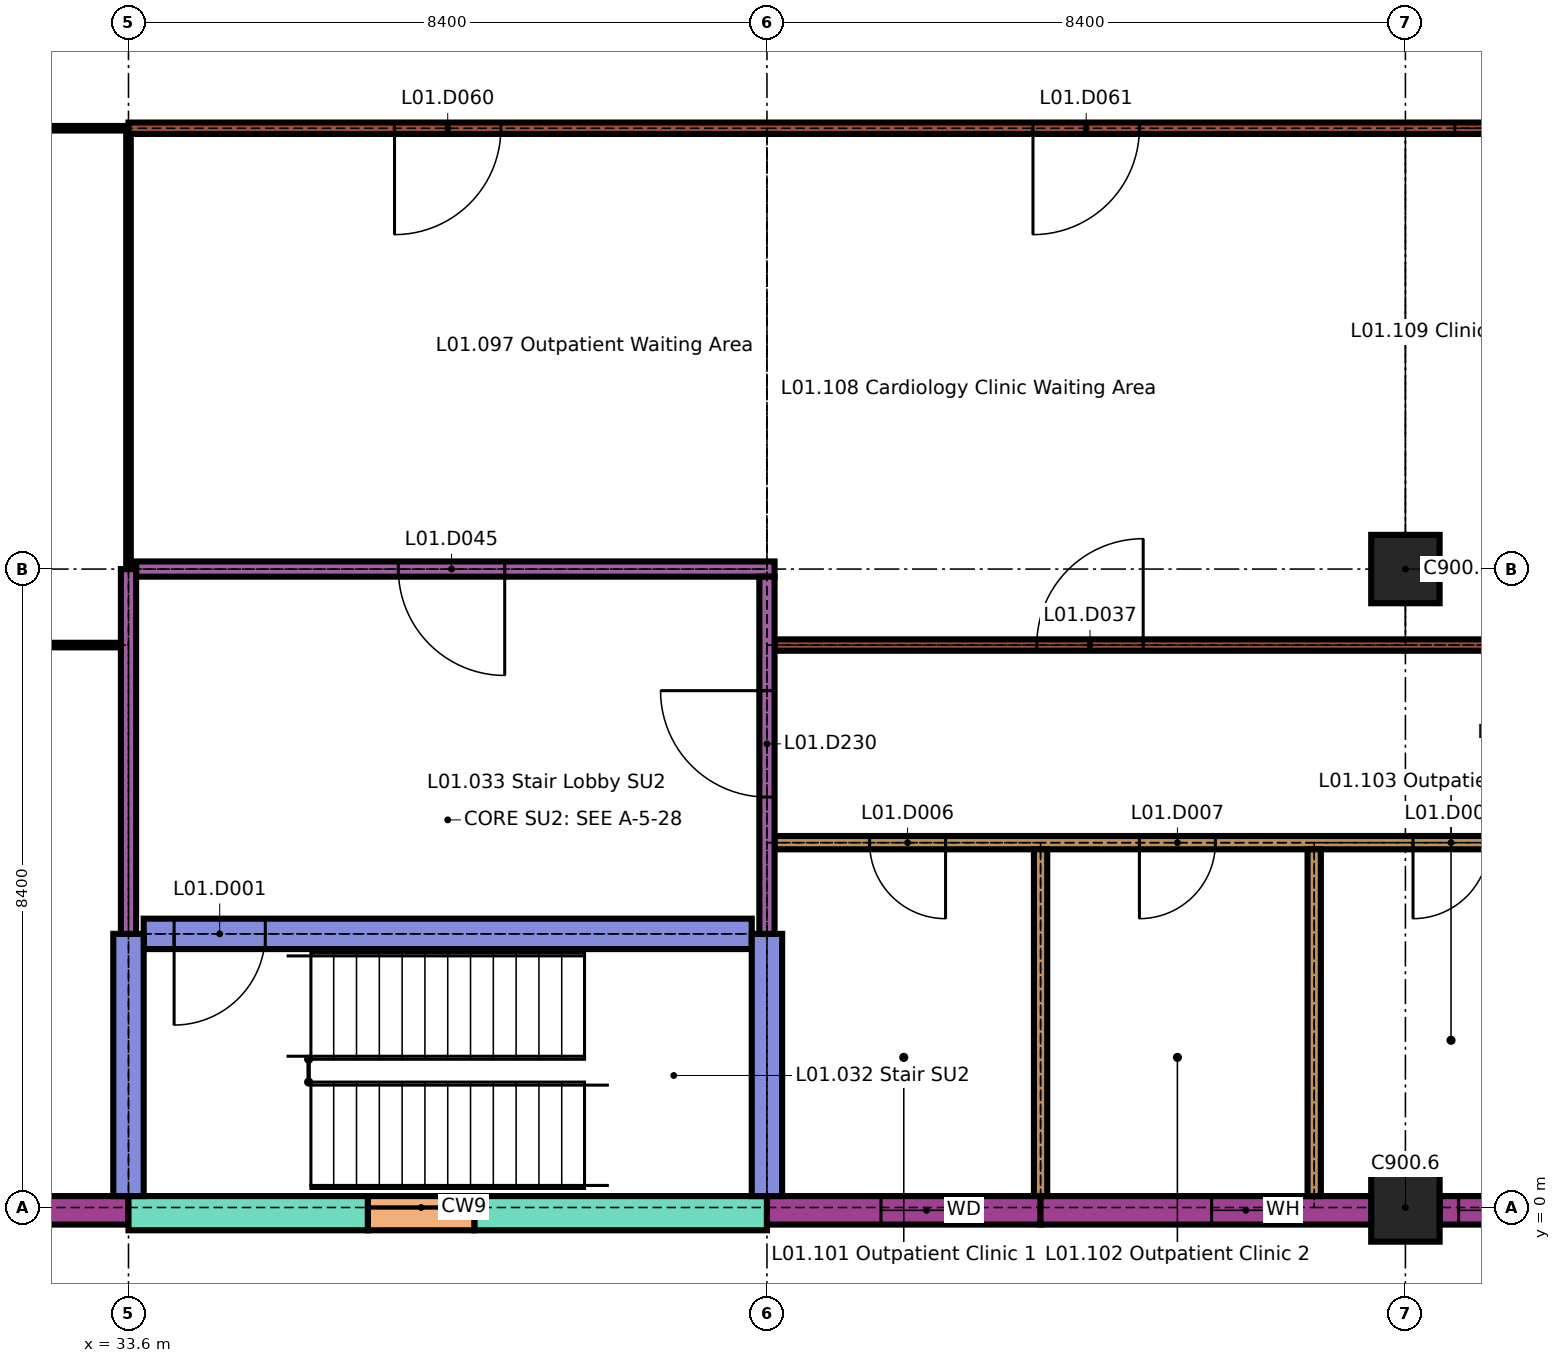
"""IFC4 building model, lengths in metres.
Left out: names, types, materials, properties, quantities, classifications, styles, units other than length and angle.
Written with IfcOpenShell. Run it as: python <this file> out.ifc"""

import sys

from ifc_helpers import new_model, si_unit, direction, frame, frame_2d, origin, origin_2d, place, context, subcontext, project, spatial, rectangle, extrude, element, fill, save


model = new_model("IFC4")
c1 = context("Model", 3, precision=1e-05, world=origin(), true_north=direction((0.0, 1.0)))
c2 = subcontext(c1, "Body", "Model", "MODEL_VIEW")
j1 = project(units=[si_unit("LENGTHUNIT", "METRE"), si_unit("PLANEANGLEUNIT", "RADIAN")], contexts=[c1])
p1 = place(None, origin())
s1 = spatial("IfcSite", under=j1, at=p1, CompositionType="ELEMENT")
p2 = place(p1, origin())
s2 = spatial("IfcBuilding", under=s1, at=p2, CompositionType="ELEMENT")
p3 = place(p2, frame((0.0, 0.0, 4.5)))
s3 = spatial("IfcBuildingStorey", under=s2, at=p3, CompositionType="ELEMENT", Elevation=4.5)
for number, where, z_axis, x_axis in (
    (1, (50.4, 0.0, 0.0), (0.0, 0.0, 1.0), (1.0, 0.0, 0.0)),
    (2, (50.4, 8.4, 0.0), (0.0, 0.0, 1.0), (1.0, 0.0, 0.0)),
):
    element("IfcColumn", number, at=place(p3, frame(where, z_axis=z_axis, x_axis=x_axis)), inside=s3, PredefinedType="COLUMN", context=c2, shape_type="SweptSolid", body=[
        extrude(rectangle(XDim=0.9, YDim=0.9, at=origin_2d()), origin(), (0.0, 0.0, 1.0), 3.45),
    ])
p4 = place(p3, frame((25.625, -0.038, 0.0), z_axis=(0.0, 0.0, 1.0), x_axis=(1.0, 0.0, 0.0)))
e3 = element("IfcWall", 3, at=p4, inside=s3, PredefinedType="SOLIDWALL", context=c2, shape_type="SweptSolid", body=[
    extrude(rectangle(XDim=7.975, YDim=0.375, at=frame_2d((3.988, 0.0))), origin(), (0.0, 0.0, 1.0), 3.15),
])
p5 = place(p3, frame((33.6, -0.075, 0.0), z_axis=(0.0, 0.0, 1.0), x_axis=(1.0, 0.0, 0.0)))
e4 = element("IfcWall", 4, at=p5, inside=s3, PredefinedType="SOLIDWALL", context=c2, shape_type="SweptSolid", body=[
    extrude(rectangle(XDim=3.15, YDim=0.45, at=frame_2d((1.575, 0.0))), origin(), (0.0, 0.0, 1.0), 3.45),
])
p6 = place(p3, frame((38.15, -0.075, 0.0), z_axis=(0.0, 0.0, 1.0), x_axis=(1.0, 0.0, 0.0)))
e5 = element("IfcWall", 5, at=p6, inside=s3, PredefinedType="SOLIDWALL", context=c2, shape_type="SweptSolid", body=[
    extrude(rectangle(XDim=3.85, YDim=0.45, at=frame_2d((1.925, 0.0))), origin(), (0.0, 0.0, 1.0), 3.45),
])
p7 = place(p3, frame((36.75, -0.075, 0.0), z_axis=(0.0, 0.0, 1.0), x_axis=(1.0, 0.0, 0.0)))
e6 = element("IfcWall", 6, at=p7, inside=s3, PredefinedType="SOLIDWALL", context=c2, shape_type="SweptSolid", body=[
    extrude(rectangle(XDim=1.4, YDim=0.45, at=frame_2d((0.7, 0.0))), origin(), (0.0, 0.0, 1.0), 0.6),
])
p8 = place(p3, frame((42.0, -0.038, 0.0), z_axis=(0.0, 0.0, 1.0), x_axis=(1.0, 0.0, 0.0)))
e7 = element("IfcWall", 7, at=p8, inside=s3, PredefinedType="SOLIDWALL", context=c2, shape_type="SweptSolid", body=[
    extrude(rectangle(XDim=3.6, YDim=0.375, at=frame_2d((1.8, 0.0))), origin(), (0.0, 0.0, 1.0), 3.15),
])
p9 = place(p8, frame((1.5, 0.0, 0.9)))
e8 = element("IfcOpeningElement", 8, at=p9, cuts=e7, PredefinedType="OPENING", context=c2, shape_type="SweptSolid", body=[
    extrude(rectangle(XDim=1.2, YDim=1.5, at=frame_2d((0.6, 0.75))), frame((0.0, 0.198, 0.0), z_axis=(0.0, -1.0, 0.0), x_axis=(1.0, 0.0, 0.0)), (0.0, 0.0, 1.0), 0.395),
])
p10 = place(p3, frame((45.6, -0.038, 0.0), z_axis=(0.0, 0.0, 1.0), x_axis=(1.0, 0.0, 0.0)))
e9 = element("IfcWall", 9, at=p10, inside=s3, PredefinedType="SOLIDWALL", context=c2, shape_type="SweptSolid", body=[
    extrude(rectangle(XDim=4.35, YDim=0.375, at=frame_2d((2.175, 0.0))), origin(), (0.0, 0.0, 1.0), 3.15),
])
p11 = place(p10, frame((2.25, 0.0, 0.9)))
e10 = element("IfcOpeningElement", 10, at=p11, cuts=e9, PredefinedType="OPENING", context=c2, shape_type="SweptSolid", body=[
    extrude(rectangle(XDim=0.9, YDim=1.5, at=frame_2d((0.45, 0.75))), frame((0.0, 0.198, 0.0), z_axis=(0.0, -1.0, 0.0), x_axis=(1.0, 0.0, 0.0)), (0.0, 0.0, 1.0), 0.395),
])
p12 = place(p3, frame((50.85, -0.038, 0.0), z_axis=(0.0, 0.0, 1.0), x_axis=(1.0, 0.0, 0.0)))
e11 = element("IfcWall", 11, at=p12, inside=s3, PredefinedType="SOLIDWALL", context=c2, shape_type="SweptSolid", body=[
    extrude(rectangle(XDim=1.95, YDim=0.375, at=frame_2d((0.975, 0.0))), origin(), (0.0, 0.0, 1.0), 3.15),
])
p13 = place(p12, frame((0.25, 0.0, 0.9)))
e12 = element("IfcOpeningElement", 12, at=p13, cuts=e11, PredefinedType="OPENING", context=c2, shape_type="SweptSolid", body=[
    extrude(rectangle(XDim=1.2, YDim=1.5, at=frame_2d((0.6, 0.75))), frame((0.0, 0.198, 0.0), z_axis=(0.0, -1.0, 0.0), x_axis=(1.0, 0.0, 0.0)), (0.0, 0.0, 1.0), 0.395),
])
p14 = place(p3, frame((33.8, 3.6, 0.0), z_axis=(0.0, 0.0, 1.0), x_axis=(1.0, 0.0, 0.0)))
e13 = element("IfcWall", 13, at=p14, inside=s3, PredefinedType="SHEAR", context=c2, shape_type="SweptSolid", body=[
    extrude(rectangle(XDim=8.0, YDim=0.4, at=frame_2d((4.0, 0.0))), origin(), (0.0, 0.0, 1.0), 3.45),
])
p15 = place(p14, frame((0.4, 0.0, 0.0)))
e14 = element("IfcOpeningElement", 14, at=p15, cuts=e13, PredefinedType="OPENING", context=c2, shape_type="SweptSolid", body=[
    extrude(rectangle(XDim=1.2, YDim=2.1, at=frame_2d((0.6, 1.05))), frame((0.0, 0.21, 0.0), z_axis=(0.0, -1.0, 0.0), x_axis=(1.0, 0.0, 0.0)), (0.0, 0.0, 1.0), 0.42),
])
p16 = place(p3, frame((42.1, 4.8, 0.0), z_axis=(0.0, 0.0, 1.0), x_axis=(1.0, 0.0, 0.0)))
e15 = element("IfcWall", 15, at=p16, inside=s3, PredefinedType="PARTITIONING", context=c2, shape_type="SweptSolid", body=[
    extrude(rectangle(XDim=25.0, YDim=0.175, at=frame_2d((12.5, 0.0))), origin(), (0.0, 0.0, 1.0), 3.45),
])
p17 = place(p16, frame((1.25, 0.0, 0.0)))
e16 = element("IfcOpeningElement", 16, at=p17, cuts=e15, PredefinedType="OPENING", context=c2, shape_type="SweptSolid", body=[
    extrude(rectangle(XDim=1.0, YDim=2.1, at=frame_2d((0.5, 1.05))), frame((0.0, 0.097, 0.0), z_axis=(0.0, -1.0, 0.0), x_axis=(1.0, 0.0, 0.0)), (0.0, 0.0, 1.0), 0.195),
])
p18 = place(p16, frame((4.8, 0.0, 0.0)))
e17 = element("IfcOpeningElement", 17, at=p18, cuts=e15, PredefinedType="OPENING", context=c2, shape_type="SweptSolid", body=[
    extrude(rectangle(XDim=1.0, YDim=2.1, at=frame_2d((0.5, 1.05))), frame((0.0, 0.097, 0.0), z_axis=(0.0, -1.0, 0.0), x_axis=(1.0, 0.0, 0.0)), (0.0, 0.0, 1.0), 0.195),
])
p19 = place(p16, frame((8.4, 0.0, 0.0)))
e18 = element("IfcOpeningElement", 18, at=p19, cuts=e15, PredefinedType="OPENING", context=c2, shape_type="SweptSolid", body=[
    extrude(rectangle(XDim=1.0, YDim=2.1, at=frame_2d((0.5, 1.05))), frame((0.0, 0.097, 0.0), z_axis=(0.0, -1.0, 0.0), x_axis=(1.0, 0.0, 0.0)), (0.0, 0.0, 1.0), 0.195),
])
p20 = place(p16, frame((12.0, 0.0, 0.0)))
e19 = element("IfcOpeningElement", 19, at=p20, cuts=e15, PredefinedType="OPENING", context=c2, shape_type="SweptSolid", body=[
    extrude(rectangle(XDim=1.0, YDim=2.1, at=frame_2d((0.5, 1.05))), frame((0.0, 0.097, 0.0), z_axis=(0.0, -1.0, 0.0), x_axis=(1.0, 0.0, 0.0)), (0.0, 0.0, 1.0), 0.195),
])
p21 = place(p16, frame((15.6, 0.0, 0.0)))
e20 = element("IfcOpeningElement", 20, at=p21, cuts=e15, PredefinedType="OPENING", context=c2, shape_type="SweptSolid", body=[
    extrude(rectangle(XDim=1.0, YDim=2.1, at=frame_2d((0.5, 1.05))), frame((0.0, 0.097, 0.0), z_axis=(0.0, -1.0, 0.0), x_axis=(1.0, 0.0, 0.0)), (0.0, 0.0, 1.0), 0.195),
])
p22 = place(p16, frame((19.2, 0.0, 0.0)))
e21 = element("IfcOpeningElement", 21, at=p22, cuts=e15, PredefinedType="OPENING", context=c2, shape_type="SweptSolid", body=[
    extrude(rectangle(XDim=1.0, YDim=2.1, at=frame_2d((0.5, 1.05))), frame((0.0, 0.097, 0.0), z_axis=(0.0, -1.0, 0.0), x_axis=(1.0, 0.0, 0.0)), (0.0, 0.0, 1.0), 0.195),
])
p23 = place(p16, frame((22.75, 0.0, 0.0)))
e22 = element("IfcOpeningElement", 22, at=p23, cuts=e15, PredefinedType="OPENING", context=c2, shape_type="SweptSolid", body=[
    extrude(rectangle(XDim=1.0, YDim=2.1, at=frame_2d((0.5, 1.05))), frame((0.0, 0.097, 0.0), z_axis=(0.0, -1.0, 0.0), x_axis=(1.0, 0.0, 0.0)), (0.0, 0.0, 1.0), 0.195),
])
p24 = place(p3, frame((25.325, 7.4, 0.0), z_axis=(0.0, 0.0, 1.0), x_axis=(1.0, 0.0, 0.0)))
e23 = element("IfcWall", 23, at=p24, inside=s3, PredefinedType="PARTITIONING", context=c2, shape_type="SweptSolid", body=[
    extrude(rectangle(XDim=8.175, YDim=0.06, at=frame_2d((4.087, 0.0))), origin(), (0.0, 0.0, 1.0), 3.45),
])
p25 = place(p24, frame((3.587, 0.0, 0.0)))
e24 = element("IfcOpeningElement", 24, at=p25, cuts=e23, PredefinedType="OPENING", context=c2, shape_type="SweptSolid", body=[
    extrude(rectangle(XDim=1.0, YDim=2.1, at=frame_2d((0.5, 1.05))), frame((0.0, 0.04, 0.0), z_axis=(0.0, -1.0, 0.0), x_axis=(1.0, 0.0, 0.0)), (0.0, 0.0, 1.0), 0.08),
])
p26 = place(p3, frame((42.1, 7.4, 0.0), z_axis=(0.0, 0.0, 1.0), x_axis=(1.0, 0.0, 0.0)))
e25 = element("IfcWall", 25, at=p26, inside=s3, PredefinedType="PARTITIONING", context=c2, shape_type="SweptSolid", body=[
    extrude(rectangle(XDim=11.1, YDim=0.15, at=frame_2d((5.55, 0.0))), origin(), (0.0, 0.0, 1.0), 3.45),
])
p27 = place(p26, frame((3.45, 0.0, 0.0)))
e26 = element("IfcOpeningElement", 26, at=p27, cuts=e25, PredefinedType="OPENING", context=c2, shape_type="SweptSolid", body=[
    extrude(rectangle(XDim=1.4, YDim=2.1, at=frame_2d((0.7, 1.05))), frame((0.0, 0.085, 0.0), z_axis=(0.0, -1.0, 0.0), x_axis=(1.0, 0.0, 0.0)), (0.0, 0.0, 1.0), 0.17),
])
p28 = place(p3, frame((33.7, 8.4, 0.0), z_axis=(0.0, 0.0, 1.0), x_axis=(1.0, 0.0, 0.0)))
e27 = element("IfcWall", 27, at=p28, inside=s3, PredefinedType="PARTITIONING", context=c2, shape_type="SweptSolid", body=[
    extrude(rectangle(XDim=8.4, YDim=0.2, at=frame_2d((4.2, 0.0))), origin(), (0.0, 0.0, 1.0), 3.45),
])
p29 = place(p28, frame((3.45, 0.0, 0.0)))
e28 = element("IfcOpeningElement", 28, at=p29, cuts=e27, PredefinedType="OPENING", context=c2, shape_type="SweptSolid", body=[
    extrude(rectangle(XDim=1.4, YDim=2.1, at=frame_2d((0.7, 1.05))), frame((0.0, 0.11, 0.0), z_axis=(0.0, -1.0, 0.0), x_axis=(1.0, 0.0, 0.0)), (0.0, 0.0, 1.0), 0.22),
])
p30 = place(p3, frame((25.2, 14.2, 0.0), z_axis=(0.0, 0.0, 1.0), x_axis=(1.0, 0.0, 0.0)))
e29 = element("IfcWall", 29, at=p30, inside=s3, PredefinedType="PARTITIONING", context=c2, shape_type="SweptSolid", body=[
    extrude(rectangle(XDim=8.4, YDim=0.06, at=frame_2d((4.2, 0.0))), origin(), (0.0, 0.0, 1.0), 3.45),
])
p31 = place(p30, frame((3.5, 0.0, 0.0)))
e30 = element("IfcOpeningElement", 30, at=p31, cuts=e29, PredefinedType="OPENING", context=c2, shape_type="SweptSolid", body=[
    extrude(rectangle(XDim=1.4, YDim=2.1, at=frame_2d((0.7, 1.05))), frame((0.0, 0.04, 0.0), z_axis=(0.0, -1.0, 0.0), x_axis=(1.0, 0.0, 0.0)), (0.0, 0.0, 1.0), 0.08),
])
p32 = place(p30, frame((1.4, 0.0, 0.9)))
e31 = element("IfcOpeningElement", 31, at=p32, cuts=e29, PredefinedType="OPENING", context=c2, shape_type="SweptSolid", body=[
    extrude(rectangle(XDim=1.8, YDim=1.0, at=frame_2d((0.9, 0.5))), frame((0.0, 0.04, 0.0), z_axis=(0.0, -1.0, 0.0), x_axis=(1.0, 0.0, 0.0)), (0.0, 0.0, 1.0), 0.08),
])
p33 = place(p3, frame((33.6, 14.2, 0.0), z_axis=(0.0, 0.0, 1.0), x_axis=(1.0, 0.0, 0.0)))
e32 = element("IfcWall", 32, at=p33, inside=s3, PredefinedType="PARTITIONING", context=c2, shape_type="SweptSolid", body=[
    extrude(rectangle(XDim=19.6, YDim=0.15, at=frame_2d((9.8, 0.0))), origin(), (0.0, 0.0, 1.0), 3.45),
])
p34 = place(p33, frame((3.5, 0.0, 0.0)))
e33 = element("IfcOpeningElement", 33, at=p34, cuts=e32, PredefinedType="OPENING", context=c2, shape_type="SweptSolid", body=[
    extrude(rectangle(XDim=1.4, YDim=2.1, at=frame_2d((0.7, 1.05))), frame((0.0, 0.085, 0.0), z_axis=(0.0, -1.0, 0.0), x_axis=(1.0, 0.0, 0.0)), (0.0, 0.0, 1.0), 0.17),
])
p35 = place(p33, frame((11.9, 0.0, 0.0)))
e34 = element("IfcOpeningElement", 34, at=p35, cuts=e32, PredefinedType="OPENING", context=c2, shape_type="SweptSolid", body=[
    extrude(rectangle(XDim=1.4, YDim=2.1, at=frame_2d((0.7, 1.05))), frame((0.0, 0.085, 0.0), z_axis=(0.0, -1.0, 0.0), x_axis=(1.0, 0.0, 0.0)), (0.0, 0.0, 1.0), 0.17),
])
p36 = place(p33, frame((17.45, 0.0, 0.9)))
e35 = element("IfcOpeningElement", 35, at=p36, cuts=e32, PredefinedType="OPENING", context=c2, shape_type="SweptSolid", body=[
    extrude(rectangle(XDim=1.5, YDim=1.0, at=frame_2d((0.75, 0.5))), frame((0.0, 0.085, 0.0), z_axis=(0.0, -1.0, 0.0), x_axis=(1.0, 0.0, 0.0)), (0.0, 0.0, 1.0), 0.17),
])
p37 = place(p3, frame((33.6, 0.15, 0.0), z_axis=(0.0, 0.0, 1.0), x_axis=(0.0, 1.0, 0.0)))
e36 = element("IfcWall", 36, at=p37, inside=s3, PredefinedType="SHEAR", context=c2, shape_type="SweptSolid", body=[
    extrude(rectangle(XDim=3.45, YDim=0.4, at=frame_2d((1.725, 0.0))), origin(), (0.0, 0.0, 1.0), 3.45),
])
p38 = place(p3, frame((33.6, 3.6, 0.0), z_axis=(0.0, 0.0, 1.0), x_axis=(0.0, 1.0, 0.0)))
e37 = element("IfcWall", 37, at=p38, inside=s3, PredefinedType="PARTITIONING", context=c2, shape_type="SweptSolid", body=[
    extrude(rectangle(XDim=4.8, YDim=0.2, at=frame_2d((2.4, 0.0))), origin(), (0.0, 0.0, 1.0), 3.45),
])
p39 = place(p3, frame((33.6, 8.4, 0.0), z_axis=(0.0, 0.0, 1.0), x_axis=(0.0, 1.0, 0.0)))
e38 = element("IfcWall", 38, at=p39, inside=s3, PredefinedType="PARTITIONING", context=c2, shape_type="SweptSolid", body=[
    extrude(rectangle(XDim=5.725, YDim=0.06, at=frame_2d((2.863, 0.0))), origin(), (0.0, 0.0, 1.0), 3.45),
])
p40 = place(p3, frame((42.0, 0.15, 0.0), z_axis=(0.0, 0.0, 1.0), x_axis=(0.0, 1.0, 0.0)))
e39 = element("IfcWall", 39, at=p40, inside=s3, PredefinedType="SHEAR", context=c2, shape_type="SweptSolid", body=[
    extrude(rectangle(XDim=3.45, YDim=0.4, at=frame_2d((1.725, 0.0))), origin(), (0.0, 0.0, 1.0), 3.45),
])
p41 = place(p3, frame((42.0, 3.6, 0.0), z_axis=(0.0, 0.0, 1.0), x_axis=(0.0, 1.0, 0.0)))
e40 = element("IfcWall", 40, at=p41, inside=s3, PredefinedType="PARTITIONING", context=c2, shape_type="SweptSolid", body=[
    extrude(rectangle(XDim=4.7, YDim=0.2, at=frame_2d((2.35, 0.0))), origin(), (0.0, 0.0, 1.0), 3.45),
])
p42 = place(p41, frame((1.8, 0.0, 0.0)))
e41 = element("IfcOpeningElement", 41, at=p42, cuts=e40, PredefinedType="OPENING", context=c2, shape_type="SweptSolid", body=[
    extrude(rectangle(XDim=1.4, YDim=2.1, at=frame_2d((0.7, 1.05))), frame((0.0, 0.11, 0.0), z_axis=(0.0, -1.0, 0.0), x_axis=(1.0, 0.0, 0.0)), (0.0, 0.0, 1.0), 0.22),
])
for number, where, z_axis, x_axis in (
    (42, (45.6, 0.15, 0.0), (0.0, 0.0, 1.0), (0.0, 1.0, 0.0)),
    (43, (49.2, 0.15, 0.0), (0.0, 0.0, 1.0), (0.0, 1.0, 0.0)),
):
    element("IfcWall", number, at=place(p3, frame(where, z_axis=z_axis, x_axis=x_axis)), inside=s3, PredefinedType="PARTITIONING", context=c2, shape_type="SweptSolid", body=[
        extrude(rectangle(XDim=4.562, YDim=0.175, at=frame_2d((2.281, 0.0))), origin(), (0.0, 0.0, 1.0), 3.45),
    ])
p43 = place(p9, origin())
e44 = element("IfcWindow", 44, at=p43, inside=s3, PartitioningType="SINGLE_PANEL", PredefinedType="WINDOW", context=c2, shape_type="SweptSolid", body=[
    extrude(rectangle(XDim=1.2, YDim=1.5, at=frame_2d((0.6, 0.75))), frame((0.0, 0.03, 0.0), z_axis=(0.0, -1.0, 0.0), x_axis=(1.0, 0.0, 0.0)), (0.0, 0.0, 1.0), 0.06),
])
fill(e8, e44)
p44 = place(p11, origin())
e45 = element("IfcWindow", 45, at=p44, inside=s3, PartitioningType="SINGLE_PANEL", PredefinedType="WINDOW", context=c2, shape_type="SweptSolid", body=[
    extrude(rectangle(XDim=0.9, YDim=1.5, at=frame_2d((0.45, 0.75))), frame((0.0, 0.03, 0.0), z_axis=(0.0, -1.0, 0.0), x_axis=(1.0, 0.0, 0.0)), (0.0, 0.0, 1.0), 0.06),
])
fill(e10, e45)
p45 = place(p13, origin())
e46 = element("IfcWindow", 46, at=p45, inside=s3, PartitioningType="SINGLE_PANEL", PredefinedType="WINDOW", context=c2, shape_type="SweptSolid", body=[
    extrude(rectangle(XDim=1.2, YDim=1.5, at=frame_2d((0.6, 0.75))), frame((0.0, 0.03, 0.0), z_axis=(0.0, -1.0, 0.0), x_axis=(1.0, 0.0, 0.0)), (0.0, 0.0, 1.0), 0.06),
])
fill(e12, e46)
p46 = place(p15, origin())
e47 = element("IfcDoor", 47, at=p46, inside=s3, OperationType="SINGLE_SWING_LEFT", PredefinedType="DOOR", context=c2, shape_type="SweptSolid", body=[
    extrude(rectangle(XDim=1.2, YDim=2.1, at=frame_2d((0.6, 1.05))), frame((0.0, 0.025, 0.0), z_axis=(0.0, -1.0, 0.0), x_axis=(1.0, 0.0, 0.0)), (0.0, 0.0, 1.0), 0.05),
])
fill(e14, e47)
p47 = place(p17, origin())
e48 = element("IfcDoor", 48, at=p47, inside=s3, OperationType="SINGLE_SWING_RIGHT", PredefinedType="DOOR", context=c2, shape_type="SweptSolid", body=[
    extrude(rectangle(XDim=1.0, YDim=2.1, at=frame_2d((0.5, 1.05))), frame((0.0, 0.035, 0.0), z_axis=(0.0, -1.0, 0.0), x_axis=(1.0, 0.0, 0.0)), (0.0, 0.0, 1.0), 0.07),
])
fill(e16, e48)
p48 = place(p18, origin())
e49 = element("IfcDoor", 49, at=p48, inside=s3, OperationType="SINGLE_SWING_LEFT", PredefinedType="DOOR", context=c2, shape_type="SweptSolid", body=[
    extrude(rectangle(XDim=1.0, YDim=2.1, at=frame_2d((0.5, 1.05))), frame((0.0, 0.035, 0.0), z_axis=(0.0, -1.0, 0.0), x_axis=(1.0, 0.0, 0.0)), (0.0, 0.0, 1.0), 0.07),
])
fill(e17, e49)
p49 = place(p19, origin())
e50 = element("IfcDoor", 50, at=p49, inside=s3, OperationType="SINGLE_SWING_LEFT", PredefinedType="DOOR", context=c2, shape_type="SweptSolid", body=[
    extrude(rectangle(XDim=1.0, YDim=2.1, at=frame_2d((0.5, 1.05))), frame((0.0, 0.035, 0.0), z_axis=(0.0, -1.0, 0.0), x_axis=(1.0, 0.0, 0.0)), (0.0, 0.0, 1.0), 0.07),
])
fill(e18, e50)
p50 = place(p27, origin())
e51 = element("IfcDoor", 51, at=p50, inside=s3, OperationType="SINGLE_SWING_LEFT", PredefinedType="DOOR", context=c2, shape_type="SweptSolid", body=[
    extrude(rectangle(XDim=1.4, YDim=2.1, at=frame_2d((0.7, 1.05))), frame((0.0, 0.025, 0.0), z_axis=(0.0, -1.0, 0.0), x_axis=(1.0, 0.0, 0.0)), (0.0, 0.0, 1.0), 0.05),
])
fill(e26, e51)
p51 = place(p29, origin())
e52 = element("IfcDoor", 52, at=p51, inside=s3, OperationType="SINGLE_SWING_RIGHT", PredefinedType="DOOR", context=c2, shape_type="SweptSolid", body=[
    extrude(rectangle(XDim=1.4, YDim=2.1, at=frame_2d((0.7, 1.05))), frame((0.0, 0.025, 0.0), z_axis=(0.0, -1.0, 0.0), x_axis=(1.0, 0.0, 0.0)), (0.0, 0.0, 1.0), 0.05),
])
fill(e28, e52)
p52 = place(p34, origin())
e53 = element("IfcDoor", 53, at=p52, inside=s3, OperationType="SINGLE_SWING_LEFT", PredefinedType="DOOR", context=c2, shape_type="SweptSolid", body=[
    extrude(rectangle(XDim=1.4, YDim=2.1, at=frame_2d((0.7, 1.05))), frame((0.0, 0.025, 0.0), z_axis=(0.0, -1.0, 0.0), x_axis=(1.0, 0.0, 0.0)), (0.0, 0.0, 1.0), 0.05),
])
fill(e33, e53)
p53 = place(p35, origin())
e54 = element("IfcDoor", 54, at=p53, inside=s3, OperationType="SINGLE_SWING_LEFT", PredefinedType="DOOR", context=c2, shape_type="SweptSolid", body=[
    extrude(rectangle(XDim=1.4, YDim=2.1, at=frame_2d((0.7, 1.05))), frame((0.0, 0.025, 0.0), z_axis=(0.0, -1.0, 0.0), x_axis=(1.0, 0.0, 0.0)), (0.0, 0.0, 1.0), 0.05),
])
fill(e34, e54)
p54 = place(p42, origin())
e55 = element("IfcDoor", 55, at=p54, inside=s3, OperationType="SINGLE_SWING_LEFT", PredefinedType="DOOR", context=c2, shape_type="SweptSolid", body=[
    extrude(rectangle(XDim=1.4, YDim=2.1, at=frame_2d((0.7, 1.05))), frame((0.0, 0.03, 0.0), z_axis=(0.0, -1.0, 0.0), x_axis=(1.0, 0.0, 0.0)), (0.0, 0.0, 1.0), 0.06),
])
fill(e41, e55)
p55 = place(p36, origin())
e56 = element("IfcWindow", 56, at=p55, inside=s3, PartitioningType="DOUBLE_PANEL_HORIZONTAL", PredefinedType="WINDOW", context=c2, shape_type="SweptSolid", body=[
    extrude(rectangle(XDim=1.5, YDim=1.0, at=frame_2d((0.75, 0.5))), frame((0.0, 0.025, 0.0), z_axis=(0.0, -1.0, 0.0), x_axis=(1.0, 0.0, 0.0)), (0.0, 0.0, 1.0), 0.05),
])
fill(e35, e56)
save(model, sys.argv[1])
